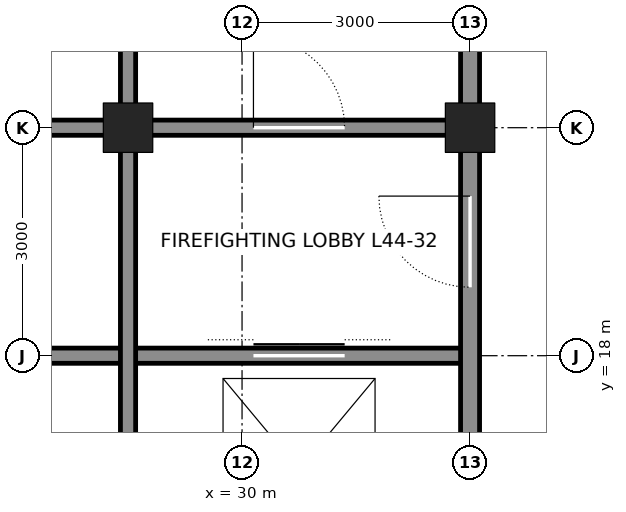
"""IFC4 building model, lengths in metres.
Left out: names, types, materials, properties, quantities, classifications, styles, units other than length and angle.
Written with IfcOpenShell. Run it as: python <this file> out.ifc"""

import sys

from ifc_helpers import new_model, si_unit, direction, frame, frame_2d, origin, origin_2d, place, context, subcontext, project, spatial, rectangle, hollow_rectangle, extrude, element, fill, save


model = new_model("IFC4")
c1 = context("Model", 3, precision=1e-05, world=origin(), true_north=direction((0.0, 1.0)))
c2 = subcontext(c1, "Body", "Model", "MODEL_VIEW")
j1 = project(units=[si_unit("LENGTHUNIT", "METRE"), si_unit("PLANEANGLEUNIT", "RADIAN")], contexts=[c1])
p1 = place(None, origin())
s1 = spatial("IfcSite", under=j1, at=p1, CompositionType="ELEMENT")
p2 = place(p1, origin())
s2 = spatial("IfcBuilding", under=s1, at=p2, CompositionType="ELEMENT")
p3 = place(p2, frame((0.0, 0.0, 201.3)))
s3 = spatial("IfcBuildingStorey", under=s2, at=p3, CompositionType="ELEMENT", Elevation=201.3)
for number, where, z_axis, x_axis in (
    (1, (33.0, 21.0, 0.0), (0.0, 0.0, 1.0), (1.0, 0.0, 0.0)),
    (2, (28.5, 21.0, 0.0), (0.0, 0.0, 1.0), (1.0, 0.0, 0.0)),
):
    element("IfcColumn", number, at=place(p3, frame(where, z_axis=z_axis, x_axis=x_axis)), inside=s3, PredefinedType="COLUMN", context=c2, shape_type="SweptSolid", body=[
        extrude(hollow_rectangle(XDim=0.65, YDim=0.65, WallThickness=0.065, at=origin_2d()), origin(), (0.0, 0.0, 1.0), 4.2),
    ])
p4 = place(p3, frame((25.5, 18.0, 0.0), z_axis=(0.0, 0.0, 1.0), x_axis=(1.0, 0.0, 0.0)))
e3 = element("IfcWall", 3, at=p4, inside=s3, PredefinedType="SOLIDWALL", context=c2, shape_type="SweptSolid", body=[
    extrude(rectangle(XDim=7.5, YDim=0.2, at=frame_2d((3.75, 0.0))), origin(), (0.0, 0.0, 1.0), 4.04),
])
p5 = place(p4, frame((4.65, 0.0, 0.0)))
e4 = element("IfcOpeningElement", 4, at=p5, cuts=e3, PredefinedType="OPENING", context=c2, shape_type="SweptSolid", body=[
    extrude(rectangle(XDim=1.2, YDim=2.1, at=frame_2d((0.6, 1.05))), frame((0.0, 0.11, 0.0), z_axis=(0.0, -1.0, 0.0), x_axis=(1.0, 0.0, 0.0)), (0.0, 0.0, 1.0), 0.22),
])
p6 = place(p3, frame((25.5, 21.0, 0.0), z_axis=(0.0, 0.0, 1.0), x_axis=(1.0, 0.0, 0.0)))
e5 = element("IfcWall", 5, at=p6, inside=s3, PredefinedType="SOLIDWALL", context=c2, shape_type="SweptSolid", body=[
    extrude(rectangle(XDim=2.75, YDim=0.2, at=frame_2d((1.375, 0.0))), origin(), (0.0, 0.0, 1.0), 3.09),
])
p7 = place(p3, frame((28.75, 21.0, 0.0), z_axis=(0.0, 0.0, 1.0), x_axis=(1.0, 0.0, 0.0)))
e6 = element("IfcWall", 6, at=p7, inside=s3, PredefinedType="SOLIDWALL", context=c2, shape_type="SweptSolid", body=[
    extrude(rectangle(XDim=4.0, YDim=0.2, at=frame_2d((2.0, 0.0))), origin(), (0.0, 0.0, 1.0), 3.09),
])
p8 = place(p7, frame((1.4, 0.0, 0.0)))
e7 = element("IfcOpeningElement", 7, at=p8, cuts=e6, PredefinedType="OPENING", context=c2, shape_type="SweptSolid", body=[
    extrude(rectangle(XDim=1.2, YDim=2.1, at=frame_2d((0.6, 1.05))), frame((0.0, 0.11, 0.0), z_axis=(0.0, -1.0, 0.0), x_axis=(1.0, 0.0, 0.0)), (0.0, 0.0, 1.0), 0.22),
])
p9 = place(p3, frame((28.5, 12.25, 0.0), z_axis=(0.0, 0.0, 1.0), x_axis=(0.0, 1.0, 0.0)))
e8 = element("IfcWall", 8, at=p9, inside=s3, PredefinedType="SOLIDWALL", context=c2, shape_type="SweptSolid", body=[
    extrude(rectangle(XDim=8.5, YDim=0.2, at=frame_2d((4.25, 0.0))), origin(), (0.0, 0.0, 1.0), 3.113),
])
p10 = place(p3, frame((28.5, 21.25, 0.0), z_axis=(0.0, 0.0, 1.0), x_axis=(0.0, 1.0, 0.0)))
e9 = element("IfcWall", 9, at=p10, inside=s3, PredefinedType="SOLIDWALL", context=c2, shape_type="SweptSolid", body=[
    extrude(rectangle(XDim=2.5, YDim=0.2, at=frame_2d((1.25, 0.0))), origin(), (0.0, 0.0, 1.0), 3.113),
])
p11 = place(p3, frame((33.0, 12.25, 0.0), z_axis=(0.0, 0.0, 1.0), x_axis=(0.0, 1.0, 0.0)))
e10 = element("IfcWall", 10, at=p11, inside=s3, PredefinedType="SOLIDWALL", context=c2, shape_type="SweptSolid", body=[
    extrude(rectangle(XDim=8.5, YDim=0.25, at=frame_2d((4.25, 0.0))), origin(), (0.0, 0.0, 1.0), 3.113),
])
p12 = place(p11, frame((6.65, 0.0, 0.0)))
e11 = element("IfcOpeningElement", 11, at=p12, cuts=e10, PredefinedType="OPENING", context=c2, shape_type="SweptSolid", body=[
    extrude(rectangle(XDim=1.2, YDim=2.1, at=frame_2d((0.6, 1.05))), frame((0.0, 0.135, 0.0), z_axis=(0.0, -1.0, 0.0), x_axis=(1.0, 0.0, 0.0)), (0.0, 0.0, 1.0), 0.27),
])
p13 = place(p11, frame((0.875, 0.0, 0.0)))
e12 = element("IfcOpeningElement", 12, at=p13, cuts=e10, PredefinedType="OPENING", context=c2, shape_type="SweptSolid", body=[
    extrude(rectangle(XDim=0.75, YDim=2.1, at=frame_2d((0.375, 1.05))), frame((0.0, 0.135, 0.0), z_axis=(0.0, -1.0, 0.0), x_axis=(1.0, 0.0, 0.0)), (0.0, 0.0, 1.0), 0.27),
])
p14 = place(p3, frame((33.0, 21.25, 0.0), z_axis=(0.0, 0.0, 1.0), x_axis=(0.0, 1.0, 0.0)))
e13 = element("IfcWall", 13, at=p14, inside=s3, PredefinedType="SOLIDWALL", context=c2, shape_type="SweptSolid", body=[
    extrude(rectangle(XDim=2.5, YDim=0.25, at=frame_2d((1.25, 0.0))), origin(), (0.0, 0.0, 1.0), 3.113),
])
p15 = place(p8, origin())
e14 = element("IfcDoor", 14, at=p15, inside=s3, OperationType="SINGLE_SWING_LEFT", PredefinedType="DOOR", context=c2, shape_type="SweptSolid", body=[
    extrude(rectangle(XDim=1.2, YDim=2.1, at=frame_2d((0.6, 1.05))), frame((0.0, 0.025, 0.0), z_axis=(0.0, -1.0, 0.0), x_axis=(1.0, 0.0, 0.0)), (0.0, 0.0, 1.0), 0.05),
])
fill(e7, e14)
p16 = place(p12, origin())
e15 = element("IfcDoor", 15, at=p16, inside=s3, OperationType="SINGLE_SWING_RIGHT", PredefinedType="DOOR", context=c2, shape_type="SweptSolid", body=[
    extrude(rectangle(XDim=1.2, YDim=2.1, at=frame_2d((0.6, 1.05))), frame((0.0, 0.025, 0.0), z_axis=(0.0, -1.0, 0.0), x_axis=(1.0, 0.0, 0.0)), (0.0, 0.0, 1.0), 0.05),
])
fill(e11, e15)
p17 = place(p5, origin())
e16 = element("IfcDoor", 16, at=p17, inside=s3, OperationType="DOUBLE_DOOR_SLIDING", PredefinedType="DOOR", context=c2, shape_type="SweptSolid", body=[
    extrude(rectangle(XDim=1.2, YDim=2.1, at=frame_2d((0.6, 1.05))), frame((0.0, 0.025, 0.0), z_axis=(0.0, -1.0, 0.0), x_axis=(1.0, 0.0, 0.0)), (0.0, 0.0, 1.0), 0.05),
])
fill(e4, e16)
save(model, sys.argv[1])
